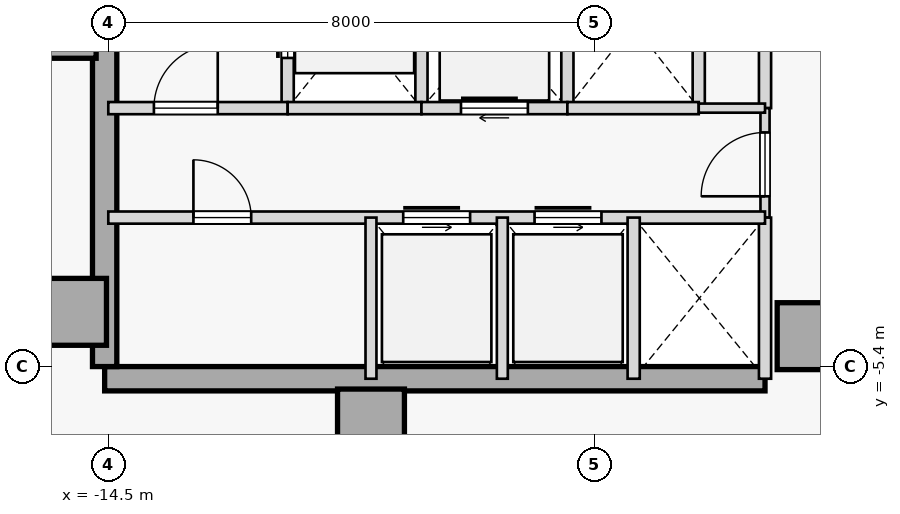
"""IFC4 building model, lengths in metres.
Left out: names, types, materials, properties, quantities, classifications, styles, units other than length and angle.
Written with IfcOpenShell. Run it as: python <this file> out.ifc"""

import sys

from ifc_helpers import new_model, si_unit, direction, frame, frame_2d, origin, origin_2d, place, context, subcontext, project, spatial, rectangle, extrude, element, fill, save


model = new_model("IFC4")
c1 = context("Model", 3, precision=1e-05, world=origin(), true_north=direction((0.0, 1.0)))
c2 = subcontext(c1, "Body", "Model", "MODEL_VIEW")
j1 = project(units=[si_unit("LENGTHUNIT", "METRE"), si_unit("PLANEANGLEUNIT", "RADIAN")], contexts=[c1])
p1 = place(None, origin())
s1 = spatial("IfcSite", under=j1, at=p1, CompositionType="ELEMENT")
p2 = place(p1, origin())
s2 = spatial("IfcBuilding", under=s1, at=p2, CompositionType="ELEMENT")
p3 = place(p2, frame((0.0, 0.0, 98.5)))
s3 = spatial("IfcBuildingStorey", under=s2, at=p3, CompositionType="ELEMENT", Elevation=98.5)
for number, where, z_axis, x_axis in (
    (1, (-15.25, 0.22, 0.0), (0.0, 0.0, 1.0), (1.0, 0.0, 0.0)),
    (2, (-15.08, -4.5, 0.0), (0.0, 0.0, 1.0), (1.0, 0.0, 0.0)),
    (3, (-10.18, -6.32, 0.0), (0.0, 0.0, 1.0), (1.0, 0.0, 0.0)),
    (4, (-2.95, -4.9, 0.0), (0.0, 0.0, 1.0), (1.0, 0.0, 0.0)),
):
    element("IfcColumn", number, at=place(p3, frame(where, z_axis=z_axis, x_axis=x_axis)), inside=s3, PredefinedType="COLUMN", context=c2, shape_type="SweptSolid", body=[
        extrude(rectangle(XDim=1.1, YDim=1.1, at=origin_2d()), origin(), (0.0, 0.0, 1.0), 3.7),
    ])
p4 = place(p3, frame((-14.56, -5.6, 0.0), z_axis=(0.0, 0.0, 1.0), x_axis=(1.0, 0.0, 0.0)))
e5 = element("IfcWall", 5, at=p4, inside=s3, PredefinedType="SHEAR", context=c2, shape_type="SweptSolid", body=[
    extrude(rectangle(XDim=10.86, YDim=0.4, at=frame_2d((5.43, 0.0))), origin(), (0.0, 0.0, 1.0), 3.475),
])
p5 = place(p3, frame((-14.56, -5.4, 0.0), z_axis=(0.0, 0.0, 1.0), x_axis=(0.0, 1.0, 0.0)))
e6 = element("IfcWall", 6, at=p5, inside=s3, PredefinedType="SHEAR", context=c2, shape_type="SweptSolid", body=[
    extrude(rectangle(XDim=10.8, YDim=0.4, at=frame_2d((5.4, 0.0))), origin(), (0.0, 0.0, 1.0), 3.475),
])
p6 = place(p3, frame((-3.7, -1.15, 0.0), z_axis=(0.0, 0.0, 1.0), x_axis=(0.0, 1.0, 0.0)))
e7 = element("IfcWall", 7, at=p6, inside=s3, PredefinedType="STANDARD", context=c2, shape_type="SweptSolid", body=[
    extrude(rectangle(XDim=6.75, YDim=0.2, at=frame_2d((3.375, 0.0))), origin(), (0.0, 0.0, 1.0), 3.475),
])
p7 = place(p6, frame((1.1, 0.0, 0.0)))
e8 = element("IfcOpeningElement", 8, at=p7, cuts=e7, PredefinedType="OPENING", context=c2, shape_type="SweptSolid", body=[
    extrude(rectangle(XDim=0.9, YDim=2.15, at=frame_2d((0.45, 1.075))), frame((0.0, 0.11, 0.0), z_axis=(0.0, -1.0, 0.0), x_axis=(1.0, 0.0, 0.0)), (0.0, 0.0, 1.0), 0.22),
])
p8 = place(p6, frame((4.0, 0.0, 0.0)))
e9 = element("IfcOpeningElement", 9, at=p8, cuts=e7, PredefinedType="OPENING", context=c2, shape_type="SweptSolid", body=[
    extrude(rectangle(XDim=0.92, YDim=2.15, at=frame_2d((0.46, 1.075))), frame((0.0, 0.11, 0.0), z_axis=(0.0, -1.0, 0.0), x_axis=(1.0, 0.0, 0.0)), (0.0, 0.0, 1.0), 0.22),
])
p9 = place(p3, frame((-3.7, -2.95, 0.0), z_axis=(0.0, 0.0, 1.0), x_axis=(0.0, 1.0, 0.0)))
e10 = element("IfcWall", 10, at=p9, inside=s3, PredefinedType="PARTITIONING", context=c2, shape_type="SweptSolid", body=[
    extrude(rectangle(XDim=1.8, YDim=0.15, at=frame_2d((0.9, 0.0))), origin(), (0.0, 0.0, 1.0), 3.475),
])
p10 = place(p9, frame((0.35, 0.0, 0.0)))
e11 = element("IfcOpeningElement", 11, at=p10, cuts=e10, PredefinedType="OPENING", context=c2, shape_type="SweptSolid", body=[
    extrude(rectangle(XDim=1.05, YDim=2.18, at=frame_2d((0.525, 1.09))), frame((0.0, 0.085, 0.0), z_axis=(0.0, -1.0, 0.0), x_axis=(1.0, 0.0, 0.0)), (0.0, 0.0, 1.0), 0.17),
])
p11 = place(p3, frame((-3.7, -5.6, 0.0), z_axis=(0.0, 0.0, 1.0), x_axis=(0.0, 1.0, 0.0)))
e12 = element("IfcWall", 12, at=p11, inside=s3, PredefinedType="STANDARD", context=c2, shape_type="SweptSolid", body=[
    extrude(rectangle(XDim=2.65, YDim=0.2, at=frame_2d((1.325, 0.0))), origin(), (0.0, 0.0, 1.0), 3.475),
])
p12 = place(p3, frame((-11.55, -1.15, 0.0), z_axis=(0.0, 0.0, 1.0), x_axis=(0.0, 1.0, 0.0)))
e13 = element("IfcWall", 13, at=p12, inside=s3, PredefinedType="STANDARD", context=c2, shape_type="SweptSolid", body=[
    extrude(rectangle(XDim=2.75, YDim=0.2, at=frame_2d((1.375, 0.0))), origin(), (0.0, 0.0, 1.0), 3.475),
])
p13 = place(p12, frame((0.825, 0.0, 0.0)))
e14 = element("IfcOpeningElement", 14, at=p13, cuts=e13, PredefinedType="OPENING", context=c2, shape_type="SweptSolid", body=[
    extrude(rectangle(XDim=1.1, YDim=2.15, at=frame_2d((0.55, 1.075))), frame((0.0, 0.11, 0.0), z_axis=(0.0, -1.0, 0.0), x_axis=(1.0, 0.0, 0.0)), (0.0, 0.0, 1.0), 0.22),
])
p14 = place(p3, frame((-9.35, -1.15, 0.0), z_axis=(0.0, 0.0, 1.0), x_axis=(0.0, 1.0, 0.0)))
e15 = element("IfcWall", 15, at=p14, inside=s3, PredefinedType="STANDARD", context=c2, shape_type="SweptSolid", body=[
    extrude(rectangle(XDim=2.75, YDim=0.2, at=frame_2d((1.375, 0.0))), origin(), (0.0, 0.0, 1.0), 3.475),
])
p15 = place(p3, frame((-14.5, -1.15, 0.0), z_axis=(0.0, 0.0, 1.0), x_axis=(1.0, 0.0, 0.0)))
e16 = element("IfcWall", 16, at=p15, inside=s3, PredefinedType="STANDARD", context=c2, shape_type="SweptSolid", body=[
    extrude(rectangle(XDim=2.95, YDim=0.2, at=frame_2d((1.475, 0.0))), origin(), (0.0, 0.0, 1.0), 3.475),
])
p16 = place(p15, frame((0.75, 0.0, 0.0)))
e17 = element("IfcOpeningElement", 17, at=p16, cuts=e16, PredefinedType="OPENING", context=c2, shape_type="SweptSolid", body=[
    extrude(rectangle(XDim=1.05, YDim=2.18, at=frame_2d((0.525, 1.09))), frame((0.0, 0.11, 0.0), z_axis=(0.0, -1.0, 0.0), x_axis=(1.0, 0.0, 0.0)), (0.0, 0.0, 1.0), 0.22),
])
p17 = place(p3, frame((-11.55, -1.15, 0.0), z_axis=(0.0, 0.0, 1.0), x_axis=(1.0, 0.0, 0.0)))
e18 = element("IfcWall", 18, at=p17, inside=s3, PredefinedType="STANDARD", context=c2, shape_type="SweptSolid", body=[
    extrude(rectangle(XDim=2.2, YDim=0.2, at=frame_2d((1.1, 0.0))), origin(), (0.0, 0.0, 1.0), 3.475),
])
p18 = place(p3, frame((-6.95, -1.15, 0.0), z_axis=(0.0, 0.0, 1.0), x_axis=(0.0, 1.0, 0.0)))
e19 = element("IfcWall", 19, at=p18, inside=s3, PredefinedType="STANDARD", context=c2, shape_type="SweptSolid", body=[
    extrude(rectangle(XDim=2.75, YDim=0.2, at=frame_2d((1.375, 0.0))), origin(), (0.0, 0.0, 1.0), 3.475),
])
p19 = place(p3, frame((-9.35, -1.15, 0.0), z_axis=(0.0, 0.0, 1.0), x_axis=(1.0, 0.0, 0.0)))
e20 = element("IfcWall", 20, at=p19, inside=s3, PredefinedType="STANDARD", context=c2, shape_type="SweptSolid", body=[
    extrude(rectangle(XDim=2.4, YDim=0.2, at=frame_2d((1.2, 0.0))), origin(), (0.0, 0.0, 1.0), 3.475),
])
p20 = place(p19, frame((0.65, 0.0, 0.0)))
e21 = element("IfcOpeningElement", 21, at=p20, cuts=e20, PredefinedType="OPENING", context=c2, shape_type="SweptSolid", body=[
    extrude(rectangle(XDim=1.1, YDim=2.15, at=frame_2d((0.55, 1.075))), frame((0.0, 0.11, 0.0), z_axis=(0.0, -1.0, 0.0), x_axis=(1.0, 0.0, 0.0)), (0.0, 0.0, 1.0), 0.22),
])
p21 = place(p3, frame((-4.79, -1.15, 0.0), z_axis=(0.0, 0.0, 1.0), x_axis=(0.0, 1.0, 0.0)))
e22 = element("IfcWall", 22, at=p21, inside=s3, PredefinedType="STANDARD", context=c2, shape_type="SweptSolid", body=[
    extrude(rectangle(XDim=2.75, YDim=0.2, at=frame_2d((1.375, 0.0))), origin(), (0.0, 0.0, 1.0), 3.475),
])
p22 = place(p3, frame((-6.95, -1.15, 0.0), z_axis=(0.0, 0.0, 1.0), x_axis=(1.0, 0.0, 0.0)))
e23 = element("IfcWall", 23, at=p22, inside=s3, PredefinedType="STANDARD", context=c2, shape_type="SweptSolid", body=[
    extrude(rectangle(XDim=2.16, YDim=0.2, at=frame_2d((1.08, 0.0))), origin(), (0.0, 0.0, 1.0), 3.475),
])
p23 = place(p3, frame((-4.79, -1.15, 0.0), z_axis=(0.0, 0.0, 1.0), x_axis=(1.0, 0.0, 0.0)))
e24 = element("IfcWall", 24, at=p23, inside=s3, PredefinedType="PARTITIONING", context=c2, shape_type="SweptSolid", body=[
    extrude(rectangle(XDim=1.09, YDim=0.15, at=frame_2d((0.545, 0.0))), origin(), (0.0, 0.0, 1.0), 3.475),
])
p24 = place(p3, frame((-14.5, -2.95, 0.0), z_axis=(0.0, 0.0, 1.0), x_axis=(1.0, 0.0, 0.0)))
e25 = element("IfcWall", 25, at=p24, inside=s3, PredefinedType="STANDARD", context=c2, shape_type="SweptSolid", body=[
    extrude(rectangle(XDim=10.8, YDim=0.2, at=frame_2d((5.4, 0.0))), origin(), (0.0, 0.0, 1.0), 3.475),
])
p25 = place(p24, frame((4.85, 0.0, 0.0)))
e26 = element("IfcOpeningElement", 26, at=p25, cuts=e25, PredefinedType="OPENING", context=c2, shape_type="SweptSolid", body=[
    extrude(rectangle(XDim=1.1, YDim=2.15, at=frame_2d((0.55, 1.075))), frame((0.0, 0.11, 0.0), z_axis=(0.0, -1.0, 0.0), x_axis=(1.0, 0.0, 0.0)), (0.0, 0.0, 1.0), 0.22),
])
p26 = place(p24, frame((7.01, 0.0, 0.0)))
e27 = element("IfcOpeningElement", 27, at=p26, cuts=e25, PredefinedType="OPENING", context=c2, shape_type="SweptSolid", body=[
    extrude(rectangle(XDim=1.1, YDim=2.15, at=frame_2d((0.55, 1.075))), frame((0.0, 0.11, 0.0), z_axis=(0.0, -1.0, 0.0), x_axis=(1.0, 0.0, 0.0)), (0.0, 0.0, 1.0), 0.22),
])
p27 = place(p24, frame((1.4, 0.0, 0.0)))
e28 = element("IfcOpeningElement", 28, at=p27, cuts=e25, PredefinedType="OPENING", context=c2, shape_type="SweptSolid", body=[
    extrude(rectangle(XDim=0.95, YDim=2.15, at=frame_2d((0.475, 1.075))), frame((0.0, 0.11, 0.0), z_axis=(0.0, -1.0, 0.0), x_axis=(1.0, 0.0, 0.0)), (0.0, 0.0, 1.0), 0.22),
])
p28 = place(p3, frame((-5.86, -5.6, 0.0), z_axis=(0.0, 0.0, 1.0), x_axis=(0.0, 1.0, 0.0)))
e29 = element("IfcWall", 29, at=p28, inside=s3, PredefinedType="STANDARD", context=c2, shape_type="SweptSolid", body=[
    extrude(rectangle(XDim=2.65, YDim=0.2, at=frame_2d((1.325, 0.0))), origin(), (0.0, 0.0, 1.0), 3.475),
])
for number, where, z_axis, x_axis in (
    (30, (-10.18, -5.6, 0.0), (0.0, 0.0, 1.0), (0.0, 1.0, 0.0)),
    (31, (-8.02, -5.6, 0.0), (0.0, 0.0, 1.0), (0.0, 1.0, 0.0)),
):
    element("IfcWall", number, at=place(p3, frame(where, z_axis=z_axis, x_axis=x_axis)), inside=s3, PredefinedType="STANDARD", context=c2, shape_type="SweptSolid", body=[
        extrude(rectangle(XDim=2.65, YDim=0.18, at=frame_2d((1.325, 0.0))), origin(), (0.0, 0.0, 1.0), 3.475),
    ])
p29 = place(p16, origin())
e32 = element("IfcDoor", 32, at=p29, inside=s3, OperationType="SINGLE_SWING_RIGHT", PredefinedType="DOOR", context=c2, shape_type="SweptSolid", body=[
    extrude(rectangle(XDim=1.05, YDim=2.18, at=frame_2d((0.525, 1.09))), frame((0.0, 0.025, 0.0), z_axis=(0.0, -1.0, 0.0), x_axis=(1.0, 0.0, 0.0)), (0.0, 0.0, 1.0), 0.05),
])
fill(e17, e32)
p30 = place(p10, origin())
e33 = element("IfcDoor", 33, at=p30, inside=s3, OperationType="SINGLE_SWING_LEFT", PredefinedType="DOOR", context=c2, shape_type="SweptSolid", body=[
    extrude(rectangle(XDim=1.05, YDim=2.18, at=frame_2d((0.525, 1.09))), frame((0.0, 0.025, 0.0), z_axis=(0.0, -1.0, 0.0), x_axis=(1.0, 0.0, 0.0)), (0.0, 0.0, 1.0), 0.05),
])
fill(e11, e33)
p31 = place(p13, origin())
e34 = element("IfcDoor", 34, at=p31, inside=s3, OperationType="SLIDING_TO_RIGHT", PredefinedType="DOOR", context=c2, shape_type="SweptSolid", body=[
    extrude(rectangle(XDim=1.1, YDim=2.15, at=frame_2d((0.55, 1.075))), frame((0.0, 0.025, 0.0), z_axis=(0.0, -1.0, 0.0), x_axis=(1.0, 0.0, 0.0)), (0.0, 0.0, 1.0), 0.05),
])
fill(e14, e34)
p32 = place(p20, origin())
e35 = element("IfcDoor", 35, at=p32, inside=s3, OperationType="SLIDING_TO_RIGHT", PredefinedType="DOOR", context=c2, shape_type="SweptSolid", body=[
    extrude(rectangle(XDim=1.1, YDim=2.15, at=frame_2d((0.55, 1.075))), frame((0.0, 0.025, 0.0), z_axis=(0.0, -1.0, 0.0), x_axis=(1.0, 0.0, 0.0)), (0.0, 0.0, 1.0), 0.05),
])
fill(e21, e35)
p33 = place(p25, origin())
e36 = element("IfcDoor", 36, at=p33, inside=s3, OperationType="SLIDING_TO_LEFT", PredefinedType="DOOR", context=c2, shape_type="SweptSolid", body=[
    extrude(rectangle(XDim=1.1, YDim=2.15, at=frame_2d((0.55, 1.075))), frame((0.0, 0.025, 0.0), z_axis=(0.0, -1.0, 0.0), x_axis=(1.0, 0.0, 0.0)), (0.0, 0.0, 1.0), 0.05),
])
fill(e26, e36)
p34 = place(p26, origin())
e37 = element("IfcDoor", 37, at=p34, inside=s3, OperationType="SLIDING_TO_LEFT", PredefinedType="DOOR", context=c2, shape_type="SweptSolid", body=[
    extrude(rectangle(XDim=1.1, YDim=2.15, at=frame_2d((0.55, 1.075))), frame((0.0, 0.025, 0.0), z_axis=(0.0, -1.0, 0.0), x_axis=(1.0, 0.0, 0.0)), (0.0, 0.0, 1.0), 0.05),
])
fill(e27, e37)
p35 = place(p27, origin())
e38 = element("IfcDoor", 38, at=p35, inside=s3, OperationType="SINGLE_SWING_LEFT", PredefinedType="DOOR", context=c2, shape_type="SweptSolid", body=[
    extrude(rectangle(XDim=0.95, YDim=2.15, at=frame_2d((0.475, 1.075))), frame((0.0, 0.025, 0.0), z_axis=(0.0, -1.0, 0.0), x_axis=(1.0, 0.0, 0.0)), (0.0, 0.0, 1.0), 0.05),
])
fill(e28, e38)
save(model, sys.argv[1])
